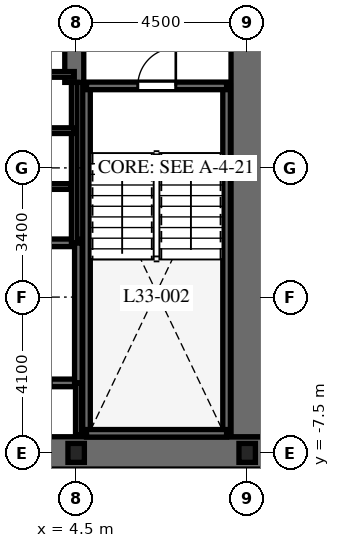
"""IFC4 building model, lengths in metres.
Left out: names, types, materials, properties, quantities, classifications, styles, units other than length and angle.
Written with IfcOpenShell. Run it as: python <this file> out.ifc"""

import sys

from ifc_helpers import new_model, si_unit, direction, frame, frame_2d, origin, origin_2d, place, context, subcontext, project, spatial, rectangle, i_section, extrude, element, fill, save


model = new_model("IFC4")
c1 = context("Model", 3, precision=1e-05, world=origin(), true_north=direction((0.0, 1.0)))
c2 = subcontext(c1, "Body", "Model", "MODEL_VIEW")
j1 = project(units=[si_unit("LENGTHUNIT", "METRE"), si_unit("PLANEANGLEUNIT", "RADIAN")], contexts=[c1])
p1 = place(None, origin())
s1 = spatial("IfcSite", under=j1, at=p1, CompositionType="ELEMENT")
p2 = place(p1, origin())
s2 = spatial("IfcBuilding", under=s1, at=p2, CompositionType="ELEMENT")
p3 = place(p2, frame((0.0, 0.0, 135.8)))
s3 = spatial("IfcBuildingStorey", under=s2, at=p3, CompositionType="ELEMENT", Elevation=135.8)
p4 = place(p3, frame((-9.425, -7.5, 0.0), z_axis=(0.0, 0.0, 1.0), x_axis=(1.0, 0.0, 0.0)))
e1 = element("IfcWall", 1, at=p4, inside=s3, PredefinedType="SHEAR", context=c2, shape_type="SweptSolid", body=[
    extrude(rectangle(XDim=18.85, YDim=0.85, at=frame_2d((9.425, 0.0))), origin(), (0.0, 0.0, 1.0), 3.7),
])
p5 = place(p4, frame((9.475, 0.0, 0.0)))
e2 = element("IfcOpeningElement", 2, at=p5, cuts=e1, PredefinedType="OPENING", context=c2, shape_type="SweptSolid", body=[
    extrude(rectangle(XDim=1.0, YDim=2.15, at=frame_2d((0.5, 1.075))), frame((0.0, 0.435, 0.0), z_axis=(0.0, -1.0, 0.0), x_axis=(1.0, 0.0, 0.0)), (0.0, 0.0, 1.0), 0.87),
])
p6 = place(p3, frame((9.0, -7.075, 0.0), z_axis=(0.0, 0.0, 1.0), x_axis=(0.0, 1.0, 0.0)))
e3 = element("IfcWall", 3, at=p6, inside=s3, PredefinedType="SHEAR", context=c2, shape_type="SweptSolid", body=[
    extrude(rectangle(XDim=14.15, YDim=0.85, at=frame_2d((7.075, 0.0))), origin(), (0.0, 0.0, 1.0), 3.7),
])
p7 = place(p6, frame((10.2, 0.0, 0.0)))
e4 = element("IfcOpeningElement", 4, at=p7, cuts=e3, PredefinedType="OPENING", context=c2, shape_type="SweptSolid", body=[
    extrude(rectangle(XDim=1.05, YDim=2.15, at=frame_2d((0.525, 1.075))), frame((0.0, 0.435, 0.0), z_axis=(0.0, -1.0, 0.0), x_axis=(1.0, 0.0, 0.0)), (0.0, 0.0, 1.0), 0.87),
])
p8 = place(p3, frame((4.45, 2.25, 0.0), z_axis=(0.0, 0.0, 1.0), x_axis=(0.0, 1.0, 0.0)))
e5 = element("IfcWall", 5, at=p8, inside=s3, PredefinedType="SHEAR", context=c2, shape_type="SweptSolid", body=[
    extrude(rectangle(XDim=4.825, YDim=0.5, at=frame_2d((2.413, 0.0))), origin(), (0.0, 0.0, 1.0), 3.7),
])
for number, where, z_axis, x_axis in (
    (6, (4.772, -6.985, 0.0), (0.0, 0.0, 1.0), (0.0, 1.0, 0.0)),
    (7, (8.458, -6.985, 0.0), (0.0, 0.0, 1.0), (0.0, 1.0, 0.0)),
):
    element("IfcWall", number, at=place(p3, frame(where, z_axis=z_axis, x_axis=x_axis)), inside=s3, PredefinedType="SHEAR", context=c2, shape_type="SweptSolid", body=[
        extrude(rectangle(XDim=9.143, YDim=0.2, at=frame_2d((4.572, 0.0))), origin(), (0.0, 0.0, 1.0), 3.7),
    ])
p9 = place(p3, frame((4.772, -6.985, 0.0), z_axis=(0.0, 0.0, 1.0), x_axis=(1.0, 0.0, 0.0)))
e8 = element("IfcWall", 8, at=p9, inside=s3, PredefinedType="SHEAR", context=c2, shape_type="SweptSolid", body=[
    extrude(rectangle(XDim=3.686, YDim=0.2, at=frame_2d((1.843, 0.0))), origin(), (0.0, 0.0, 1.0), 3.7),
])
p10 = place(p3, frame((4.772, 2.158, 0.0), z_axis=(0.0, 0.0, 1.0), x_axis=(1.0, 0.0, 0.0)))
e9 = element("IfcWall", 9, at=p10, inside=s3, PredefinedType="SHEAR", context=c2, shape_type="SweptSolid", body=[
    extrude(rectangle(XDim=3.686, YDim=0.2, at=frame_2d((1.843, 0.0))), origin(), (0.0, 0.0, 1.0), 3.7),
])
p11 = place(p10, frame((1.35, 0.0, 0.0)))
e10 = element("IfcOpeningElement", 10, at=p11, cuts=e9, PredefinedType="OPENING", context=c2, shape_type="SweptSolid", body=[
    extrude(rectangle(XDim=1.0, YDim=2.15, at=frame_2d((0.5, 1.075))), frame((0.0, 0.11, 0.0), z_axis=(0.0, -1.0, 0.0), x_axis=(1.0, 0.0, 0.0)), (0.0, 0.0, 1.0), 0.22),
])
p12 = place(p3, frame((-4.608, -5.658, 0.0), z_axis=(0.0, 0.0, 1.0), x_axis=(1.0, 0.0, 0.0)))
e11 = element("IfcWall", 11, at=p12, inside=s3, PredefinedType="SHEAR", context=c2, shape_type="SweptSolid", body=[
    extrude(rectangle(XDim=9.166, YDim=0.2, at=frame_2d((4.583, 0.0))), origin(), (0.0, 0.0, 1.0), 3.7),
])
p13 = place(p12, frame((7.45, 0.0, 0.0)))
e12 = element("IfcOpeningElement", 12, at=p13, cuts=e11, PredefinedType="OPENING", context=c2, shape_type="SweptSolid", body=[
    extrude(rectangle(XDim=1.0, YDim=2.15, at=frame_2d((0.5, 1.075))), frame((0.0, 0.11, 0.0), z_axis=(0.0, -1.0, 0.0), x_axis=(1.0, 0.0, 0.0)), (0.0, 0.0, 1.0), 0.22),
])
p14 = place(p3, frame((-4.608, -1.972, 0.0), z_axis=(0.0, 0.0, 1.0), x_axis=(1.0, 0.0, 0.0)))
e13 = element("IfcWall", 13, at=p14, inside=s3, PredefinedType="SHEAR", context=c2, shape_type="SweptSolid", body=[
    extrude(rectangle(XDim=9.166, YDim=0.2, at=frame_2d((4.583, 0.0))), origin(), (0.0, 0.0, 1.0), 3.7),
])
p15 = place(p3, frame((4.558, -5.658, 0.0), z_axis=(0.0, 0.0, 1.0), x_axis=(0.0, 1.0, 0.0)))
e14 = element("IfcWall", 14, at=p15, inside=s3, PredefinedType="SHEAR", context=c2, shape_type="SweptSolid", body=[
    extrude(rectangle(XDim=3.686, YDim=0.2, at=frame_2d((1.843, 0.0))), origin(), (0.0, 0.0, 1.0), 3.7),
])
for number, where, z_axis, x_axis in (
    (15, (4.5, -7.5, 0.0), (0.0, 0.0, 1.0), (1.0, 0.0, 0.0)),
    (16, (9.0, -7.5, 0.0), (0.0, 0.0, 1.0), (1.0, 0.0, 0.0)),
):
    element("IfcColumn", number, at=place(p3, frame(where, z_axis=z_axis, x_axis=x_axis)), inside=s3, PredefinedType="COLUMN", context=c2, shape_type="SweptSolid", body=[
        extrude(i_section(OverallWidth=0.432, OverallDepth=0.498, WebThickness=0.056, FlangeThickness=0.089, at=origin_2d()), origin(), (0.0, 0.0, 1.0), 3.7),
    ])
p16 = place(p3, frame((4.558, -7.02, 0.0), z_axis=(0.0, 0.0, 1.0), x_axis=(0.0, 1.0, 0.0)))
e17 = element("IfcWall", 17, at=p16, inside=s3, PredefinedType="PARTITIONING", context=c2, shape_type="SweptSolid", body=[
    extrude(rectangle(XDim=1.362, YDim=0.15, at=frame_2d((0.681, 0.0))), origin(), (0.0, 0.0, 1.0), 3.38),
])
p17 = place(p3, frame((4.45, -1.972, 0.0), z_axis=(0.0, 0.0, 1.0), x_axis=(0.0, 1.0, 0.0)))
e18 = element("IfcWall", 18, at=p17, inside=s3, PredefinedType="PARTITIONING", context=c2, shape_type="SweptSolid", body=[
    extrude(rectangle(XDim=4.222, YDim=0.15, at=frame_2d((2.111, 0.0))), origin(), (0.0, 0.0, 1.0), 3.38),
])
for number, where, z_axis, x_axis in (
    (19, (1.9, 0.98, 0.0), (0.0, 0.0, 1.0), (1.0, 0.0, 0.0)),
    (20, (1.9, 2.46, 0.0), (0.0, 0.0, 1.0), (1.0, 0.0, 0.0)),
):
    element("IfcWall", number, at=place(p3, frame(where, z_axis=z_axis, x_axis=x_axis)), inside=s3, PredefinedType="PARTITIONING", context=c2, shape_type="SweptSolid", body=[
        extrude(rectangle(XDim=2.55, YDim=0.15, at=frame_2d((1.275, 0.0))), origin(), (0.0, 0.0, 1.0), 3.38),
    ])
p18 = place(p3, frame((-4.36, -0.49, 0.0), z_axis=(0.0, 0.0, 1.0), x_axis=(1.0, 0.0, 0.0)))
e21 = element("IfcWall", 21, at=p18, inside=s3, PredefinedType="PARTITIONING", context=c2, shape_type="SweptSolid", body=[
    extrude(rectangle(XDim=8.72, YDim=0.15, at=frame_2d((4.36, 0.0))), origin(), (0.0, 0.0, 1.0), 3.38),
])
p19 = place(p18, frame((3.86, 0.0, 0.0)))
e22 = element("IfcOpeningElement", 22, at=p19, cuts=e21, PredefinedType="OPENING", context=c2, shape_type="SweptSolid", body=[
    extrude(rectangle(XDim=0.9, YDim=2.03, at=frame_2d((0.45, 1.015))), frame((0.0, 0.085, 0.0), z_axis=(0.0, -1.0, 0.0), x_axis=(1.0, 0.0, 0.0)), (0.0, 0.0, 1.0), 0.17),
])
p20 = place(p11, origin())
e23 = element("IfcDoor", 23, at=p20, inside=s3, OperationType="SINGLE_SWING_RIGHT", PredefinedType="DOOR", context=c2, shape_type="SweptSolid", body=[
    extrude(rectangle(XDim=1.0, YDim=2.15, at=frame_2d((0.5, 1.075))), frame((0.0, 0.025, 0.0), z_axis=(0.0, -1.0, 0.0), x_axis=(1.0, 0.0, 0.0)), (0.0, 0.0, 1.0), 0.05),
])
fill(e10, e23)
save(model, sys.argv[1])
